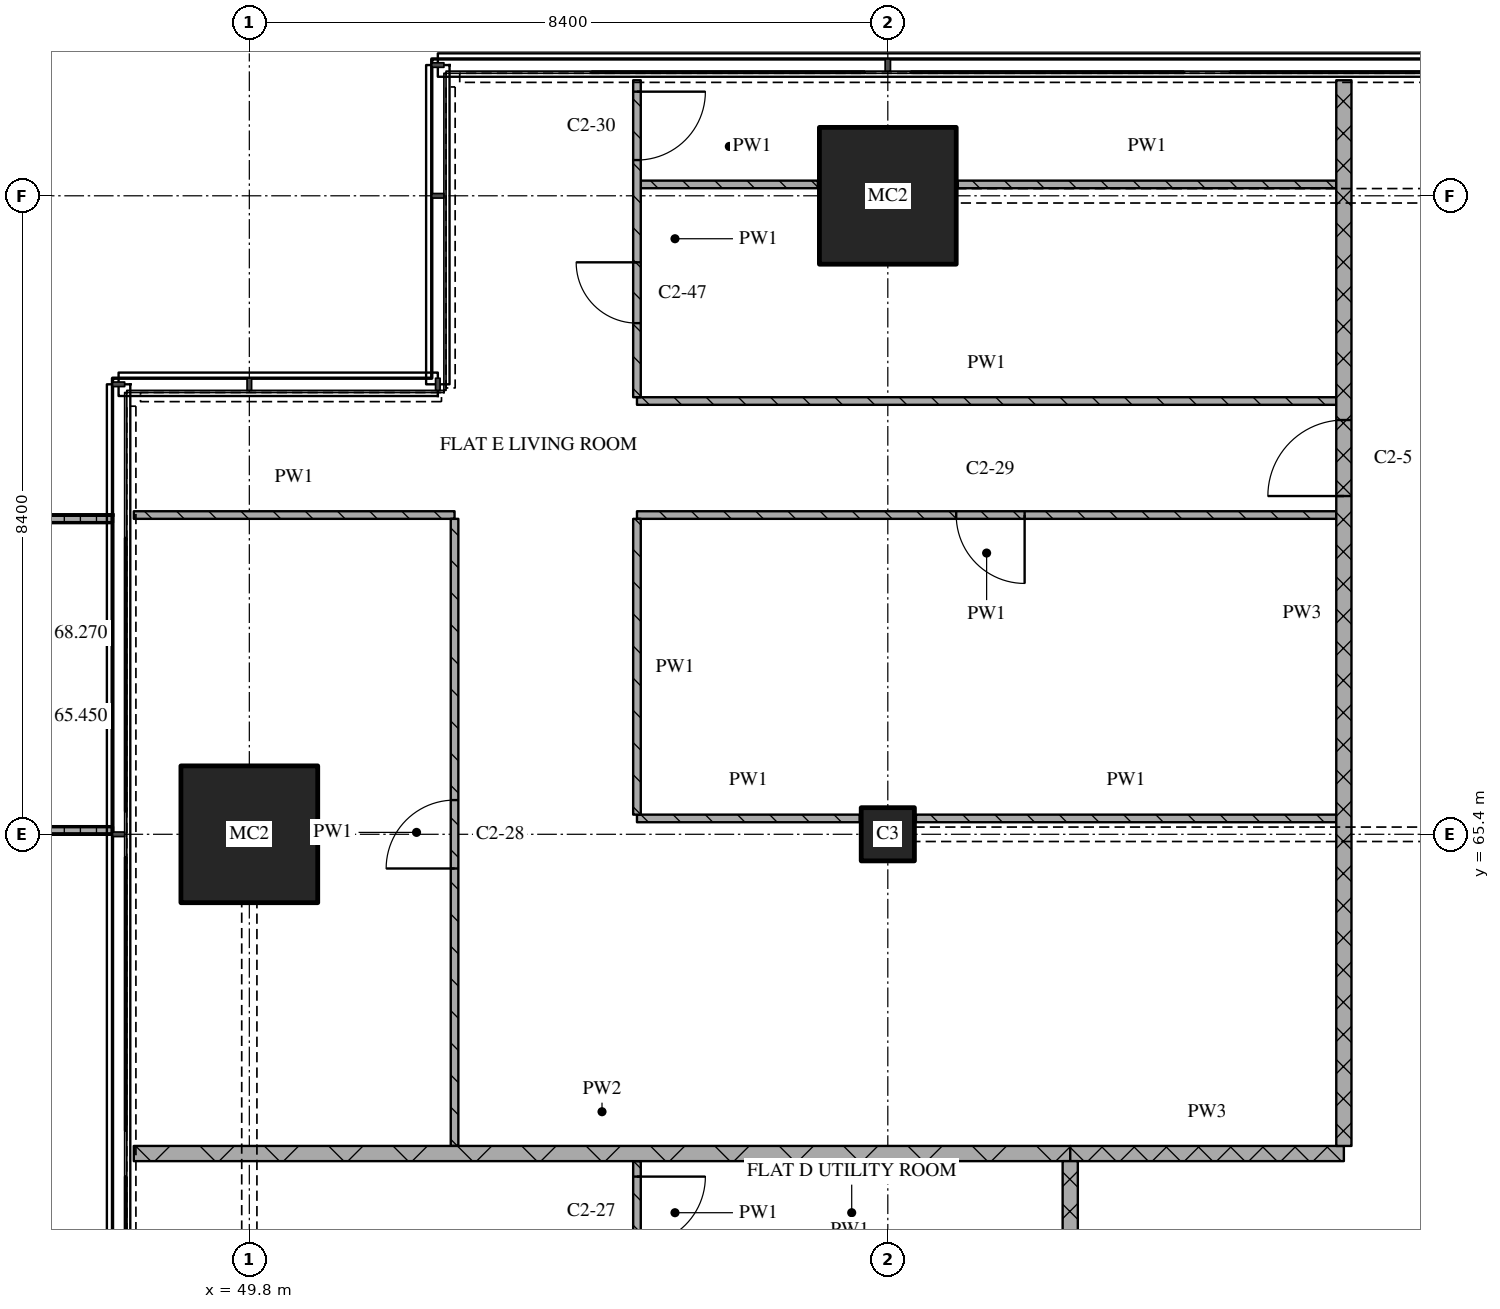
"""IFC4 building model, lengths in metres.
Left out: names, types, materials, properties, quantities, classifications, styles, units other than length and angle.
Written with IfcOpenShell. Run it as: python <this file> out.ifc"""

import sys

from ifc_helpers import new_model, si_unit, direction, frame, frame_2d, origin, origin_2d, place, context, subcontext, project, spatial, polyline, rectangle, outline, extrude, element, fill, save


model = new_model("IFC4")
c1 = context("Model", 3, precision=1e-05, world=origin(), true_north=direction((0.0, 1.0)))
c2 = subcontext(c1, "Body", "Model", "MODEL_VIEW")
j1 = project(units=[si_unit("LENGTHUNIT", "METRE"), si_unit("PLANEANGLEUNIT", "RADIAN")], contexts=[c1])
p1 = place(None, origin())
s1 = spatial("IfcSite", under=j1, at=p1, CompositionType="ELEMENT")
p2 = place(p1, origin())
s2 = spatial("IfcBuilding", under=s1, at=p2, CompositionType="ELEMENT")
p3 = place(p2, frame((0.0, 0.0, 165.45)))
s3 = spatial("IfcBuildingStorey", under=s2, at=p3, CompositionType="ELEMENT", Elevation=165.45)
p4 = place(p3, frame((49.8, 65.4, 0.0), z_axis=(0.0, 0.0, 1.0), x_axis=(1.0, 0.0, 0.0)))
e1 = element("IfcColumn", 1, at=p4, inside=s3, PredefinedType="COLUMN", context=c2, shape_type="SweptSolid", body=[
    extrude(rectangle(XDim=1.8, YDim=1.8, at=origin_2d()), origin(), (0.0, 0.0, 1.0), 3.6),
])
p5 = place(p3, frame((58.2, 65.4, 0.0), z_axis=(0.0, 0.0, 1.0), x_axis=(1.0, 0.0, 0.0)))
e2 = element("IfcColumn", 2, at=p5, inside=s3, PredefinedType="COLUMN", context=c2, shape_type="SweptSolid", body=[
    extrude(rectangle(XDim=0.7, YDim=0.7, at=origin_2d()), origin(), (0.0, 0.0, 1.0), 3.6),
])
p6 = place(p3, frame((58.2, 73.8, 0.0), z_axis=(0.0, 0.0, 1.0), x_axis=(1.0, 0.0, 0.0)))
e3 = element("IfcColumn", 3, at=p6, inside=s3, PredefinedType="COLUMN", context=c2, shape_type="SweptSolid", body=[
    extrude(rectangle(XDim=1.8, YDim=1.8, at=origin_2d()), origin(), (0.0, 0.0, 1.0), 3.6),
])
p7 = place(p3, origin())
e4 = element("IfcWall", 4, at=p7, inside=s3, PredefinedType="SOLIDWALL", context=c2, shape_type="SweptSolid", body=[
    extrude(outline(polyline([(48.0, 69.6), (48.0, 69.5), (46.367, 69.5), (46.367, 65.5), (48.0, 65.5), (48.0, 65.4), (46.267, 65.4), (46.267, 69.6), (48.0, 69.6)])), origin(), (0.0, 0.0, 1.0), 1.0),
])
p8 = place(p3, frame((60.6, 61.2, 0.0), z_axis=(0.0, 0.0, 1.0), x_axis=(1.0, 0.0, 0.0)))
e5 = element("IfcWall", 5, at=p8, inside=s3, PredefinedType="PARTITIONING", context=c2, shape_type="SweptSolid", body=[
    extrude(rectangle(XDim=3.6, YDim=0.2, at=frame_2d((1.8, 0.0))), origin(), (0.0, 0.0, 1.0), 3.32),
])
p9 = place(p3, frame((48.28, 61.2, 0.0), z_axis=(0.0, 0.0, 1.0), x_axis=(1.0, 0.0, 0.0)))
e6 = element("IfcWall", 6, at=p9, inside=s3, PredefinedType="PARTITIONING", context=c2, shape_type="SweptSolid", body=[
    extrude(rectangle(XDim=12.32, YDim=0.2, at=frame_2d((6.16, 0.0))), origin(), (0.0, 0.0, 1.0), 3.32),
])
p10 = place(p3, frame((54.9, 65.609, 0.0), z_axis=(0.0, 0.0, 1.0), x_axis=(1.0, 0.0, 0.0)))
e7 = element("IfcWall", 7, at=p10, inside=s3, PredefinedType="PARTITIONING", context=c2, shape_type="SweptSolid", body=[
    extrude(rectangle(XDim=2.93, YDim=0.1, at=frame_2d((1.465, 0.0))), origin(), (0.0, 0.0, 1.0), 3.32),
])
p11 = place(p3, frame((58.57, 65.609, 0.0), z_axis=(0.0, 0.0, 1.0), x_axis=(1.0, 0.0, 0.0)))
e8 = element("IfcWall", 8, at=p11, inside=s3, PredefinedType="PARTITIONING", context=c2, shape_type="SweptSolid", body=[
    extrude(rectangle(XDim=5.53, YDim=0.1, at=frame_2d((2.765, 0.0))), origin(), (0.0, 0.0, 1.0), 3.32),
])
p12 = place(p3, frame((48.28, 69.6, 0.0), z_axis=(0.0, 0.0, 1.0), x_axis=(1.0, 0.0, 0.0)))
e9 = element("IfcWall", 9, at=p12, inside=s3, PredefinedType="PARTITIONING", context=c2, shape_type="SweptSolid", body=[
    extrude(rectangle(XDim=4.22, YDim=0.1, at=frame_2d((2.11, 0.0))), origin(), (0.0, 0.0, 1.0), 3.32),
])
p13 = place(p3, frame((64.1, 69.6, 0.0), z_axis=(0.0, 0.0, 1.0), x_axis=(-1.0, 0.0, 0.0)))
e10 = element("IfcWall", 10, at=p13, inside=s3, PredefinedType="PARTITIONING", context=c2, shape_type="SweptSolid", body=[
    extrude(rectangle(XDim=9.2, YDim=0.1, at=frame_2d((4.6, 0.0))), origin(), (0.0, 0.0, 1.0), 3.32),
])
p14 = place(p13, frame((4.1, 0.0, 0.0)))
e11 = element("IfcOpeningElement", 11, at=p14, cuts=e10, PredefinedType="OPENING", context=c2, shape_type="SweptSolid", body=[
    extrude(rectangle(XDim=0.9, YDim=2.1, at=frame_2d((0.45, 1.05))), frame((0.0, 0.06, 0.0), z_axis=(0.0, -1.0, 0.0), x_axis=(1.0, 0.0, 0.0)), (0.0, 0.0, 1.0), 0.12),
])
p15 = place(p3, frame((54.9, 71.1, 0.0), z_axis=(0.0, 0.0, 1.0), x_axis=(1.0, 0.0, 0.0)))
e12 = element("IfcWall", 12, at=p15, inside=s3, PredefinedType="PARTITIONING", context=c2, shape_type="SweptSolid", body=[
    extrude(rectangle(XDim=9.2, YDim=0.1, at=frame_2d((4.6, 0.0))), origin(), (0.0, 0.0, 1.0), 3.32),
])
p16 = place(p3, frame((54.95, 73.949, 0.0), z_axis=(0.0, 0.0, 1.0), x_axis=(1.0, 0.0, 0.0)))
e13 = element("IfcWall", 13, at=p16, inside=s3, PredefinedType="PARTITIONING", context=c2, shape_type="SweptSolid", body=[
    extrude(rectangle(XDim=2.33, YDim=0.1, at=frame_2d((1.165, 0.0))), origin(), (0.0, 0.0, 1.0), 3.32),
])
p17 = place(p3, frame((59.12, 73.949, 0.0), z_axis=(0.0, 0.0, 1.0), x_axis=(1.0, 0.0, 0.0)))
e14 = element("IfcWall", 14, at=p17, inside=s3, PredefinedType="PARTITIONING", context=c2, shape_type="SweptSolid", body=[
    extrude(rectangle(XDim=4.98, YDim=0.1, at=frame_2d((2.49, 0.0))), origin(), (0.0, 0.0, 1.0), 3.32),
])
p18 = place(p3, frame((52.5, 61.3, 0.0), z_axis=(0.0, 0.0, 1.0), x_axis=(0.0, 1.0, 0.0)))
e15 = element("IfcWall", 15, at=p18, inside=s3, PredefinedType="PARTITIONING", context=c2, shape_type="SweptSolid", body=[
    extrude(rectangle(XDim=8.25, YDim=0.1, at=frame_2d((4.125, 0.0))), origin(), (0.0, 0.0, 1.0), 3.32),
])
p19 = place(p18, frame((3.65, 0.0, 0.0)))
e16 = element("IfcOpeningElement", 16, at=p19, cuts=e15, PredefinedType="OPENING", context=c2, shape_type="SweptSolid", body=[
    extrude(rectangle(XDim=0.9, YDim=2.1, at=frame_2d((0.45, 1.05))), frame((0.0, 0.06, 0.0), z_axis=(0.0, -1.0, 0.0), x_axis=(1.0, 0.0, 0.0)), (0.0, 0.0, 1.0), 0.12),
])
p20 = place(p3, frame((54.9, 61.1, 0.0), z_axis=(0.0, 0.0, 1.0), x_axis=(0.0, -1.0, 0.0)))
e17 = element("IfcWall", 17, at=p20, inside=s3, PredefinedType="PARTITIONING", context=c2, shape_type="SweptSolid", body=[
    extrude(rectangle(XDim=1.357, YDim=0.1, at=frame_2d((0.679, 0.0))), origin(), (0.0, 0.0, 1.0), 3.32),
])
p21 = place(p20, frame((0.204, 0.0, 0.0)))
e18 = element("IfcOpeningElement", 18, at=p21, cuts=e17, PredefinedType="OPENING", context=c2, shape_type="SweptSolid", body=[
    extrude(rectangle(XDim=0.9, YDim=2.1, at=frame_2d((0.45, 1.05))), frame((0.0, 0.06, 0.0), z_axis=(0.0, -1.0, 0.0), x_axis=(1.0, 0.0, 0.0)), (0.0, 0.0, 1.0), 0.12),
])
p22 = place(p3, frame((54.9, 69.55, 0.0), z_axis=(0.0, 0.0, 1.0), x_axis=(0.0, -1.0, 0.0)))
e19 = element("IfcWall", 19, at=p22, inside=s3, PredefinedType="PARTITIONING", context=c2, shape_type="SweptSolid", body=[
    extrude(rectangle(XDim=3.891, YDim=0.1, at=frame_2d((1.946, 0.0))), origin(), (0.0, 0.0, 1.0), 3.32),
])
p23 = place(p3, frame((54.9, 75.32, 0.0), z_axis=(0.0, 0.0, 1.0), x_axis=(0.0, -1.0, 0.0)))
e20 = element("IfcWall", 20, at=p23, inside=s3, PredefinedType="PARTITIONING", context=c2, shape_type="SweptSolid", body=[
    extrude(rectangle(XDim=4.17, YDim=0.1, at=frame_2d((2.085, 0.0))), origin(), (0.0, 0.0, 1.0), 3.32),
])
p24 = place(p23, frame((0.15, 0.0, 0.0)))
e21 = element("IfcOpeningElement", 21, at=p24, cuts=e20, PredefinedType="OPENING", context=c2, shape_type="SweptSolid", body=[
    extrude(rectangle(XDim=0.9, YDim=2.1, at=frame_2d((0.45, 1.05))), frame((0.0, 0.06, 0.0), z_axis=(0.0, -1.0, 0.0), x_axis=(1.0, 0.0, 0.0)), (0.0, 0.0, 1.0), 0.12),
])
p25 = place(p23, frame((2.395, 0.0, 0.0)))
e22 = element("IfcOpeningElement", 22, at=p25, cuts=e20, PredefinedType="OPENING", context=c2, shape_type="SweptSolid", body=[
    extrude(rectangle(XDim=0.8, YDim=2.1, at=frame_2d((0.4, 1.05))), frame((0.0, 0.06, 0.0), z_axis=(0.0, -1.0, 0.0), x_axis=(1.0, 0.0, 0.0)), (0.0, 0.0, 1.0), 0.12),
])
p26 = place(p3, frame((60.6, 43.3, 0.0), z_axis=(0.0, 0.0, 1.0), x_axis=(0.0, 1.0, 0.0)))
e23 = element("IfcWall", 23, at=p26, inside=s3, PredefinedType="PARTITIONING", context=c2, shape_type="SweptSolid", body=[
    extrude(rectangle(XDim=17.8, YDim=0.2, at=frame_2d((8.9, 0.0))), origin(), (0.0, 0.0, 1.0), 3.32),
])
p27 = place(p26, frame((7.95, 0.0, 0.0)))
e24 = element("IfcOpeningElement", 24, at=p27, cuts=e23, PredefinedType="OPENING", context=c2, shape_type="SweptSolid", body=[
    extrude(rectangle(XDim=1.0, YDim=2.1, at=frame_2d((0.5, 1.05))), frame((0.0, 0.11, 0.0), z_axis=(0.0, -1.0, 0.0), x_axis=(1.0, 0.0, 0.0)), (0.0, 0.0, 1.0), 0.22),
])
p28 = place(p3, frame((64.2, 61.3, 0.0), z_axis=(0.0, 0.0, 1.0), x_axis=(0.0, 1.0, 0.0)))
e25 = element("IfcWall", 25, at=p28, inside=s3, PredefinedType="PARTITIONING", context=c2, shape_type="SweptSolid", body=[
    extrude(rectangle(XDim=14.02, YDim=0.2, at=frame_2d((7.01, 0.0))), origin(), (0.0, 0.0, 1.0), 3.32),
])
p29 = place(p28, frame((8.55, 0.0, 0.0)))
e26 = element("IfcOpeningElement", 26, at=p29, cuts=e25, PredefinedType="OPENING", context=c2, shape_type="SweptSolid", body=[
    extrude(rectangle(XDim=1.0, YDim=2.1, at=frame_2d((0.5, 1.05))), frame((0.0, 0.11, 0.0), z_axis=(0.0, -1.0, 0.0), x_axis=(1.0, 0.0, 0.0)), (0.0, 0.0, 1.0), 0.22),
])
p30 = place(p14, origin())
e27 = element("IfcDoor", 27, at=p30, inside=s3, OperationType="SINGLE_SWING_LEFT", PredefinedType="DOOR", context=c2, shape_type="SweptSolid", body=[
    extrude(rectangle(XDim=0.9, YDim=2.1, at=frame_2d((0.45, 1.05))), frame((0.0, 0.025, 0.0), z_axis=(0.0, -1.0, 0.0), x_axis=(1.0, 0.0, 0.0)), (0.0, 0.0, 1.0), 0.05),
])
fill(e11, e27)
p31 = place(p19, origin())
e28 = element("IfcDoor", 28, at=p31, inside=s3, OperationType="SINGLE_SWING_LEFT", PredefinedType="DOOR", context=c2, shape_type="SweptSolid", body=[
    extrude(rectangle(XDim=0.9, YDim=2.1, at=frame_2d((0.45, 1.05))), frame((0.0, 0.025, 0.0), z_axis=(0.0, -1.0, 0.0), x_axis=(1.0, 0.0, 0.0)), (0.0, 0.0, 1.0), 0.05),
])
fill(e16, e28)
p32 = place(p21, origin())
e29 = element("IfcDoor", 29, at=p32, inside=s3, OperationType="SINGLE_SWING_LEFT", PredefinedType="DOOR", context=c2, shape_type="SweptSolid", body=[
    extrude(rectangle(XDim=0.9, YDim=2.1, at=frame_2d((0.45, 1.05))), frame((0.0, 0.025, 0.0), z_axis=(0.0, -1.0, 0.0), x_axis=(1.0, 0.0, 0.0)), (0.0, 0.0, 1.0), 0.05),
])
fill(e18, e29)
p33 = place(p24, origin())
e30 = element("IfcDoor", 30, at=p33, inside=s3, OperationType="SINGLE_SWING_LEFT", PredefinedType="DOOR", context=c2, shape_type="SweptSolid", body=[
    extrude(rectangle(XDim=0.9, YDim=2.1, at=frame_2d((0.45, 1.05))), frame((0.0, 0.025, 0.0), z_axis=(0.0, -1.0, 0.0), x_axis=(1.0, 0.0, 0.0)), (0.0, 0.0, 1.0), 0.05),
])
fill(e21, e30)
p34 = place(p25, origin())
e31 = element("IfcDoor", 31, at=p34, inside=s3, OperationType="SINGLE_SWING_RIGHT", PredefinedType="DOOR", context=c2, shape_type="SweptSolid", body=[
    extrude(rectangle(XDim=0.8, YDim=2.1, at=frame_2d((0.4, 1.05))), frame((0.0, 0.025, 0.0), z_axis=(0.0, -1.0, 0.0), x_axis=(1.0, 0.0, 0.0)), (0.0, 0.0, 1.0), 0.05),
])
fill(e22, e31)
p35 = place(p29, origin())
e32 = element("IfcDoor", 32, at=p35, inside=s3, OperationType="SINGLE_SWING_LEFT", PredefinedType="DOOR", context=c2, shape_type="SweptSolid", body=[
    extrude(rectangle(XDim=1.0, YDim=2.1, at=frame_2d((0.5, 1.05))), frame((0.0, 0.025, 0.0), z_axis=(0.0, -1.0, 0.0), x_axis=(1.0, 0.0, 0.0)), (0.0, 0.0, 1.0), 0.05),
])
fill(e26, e32)
save(model, sys.argv[1])
